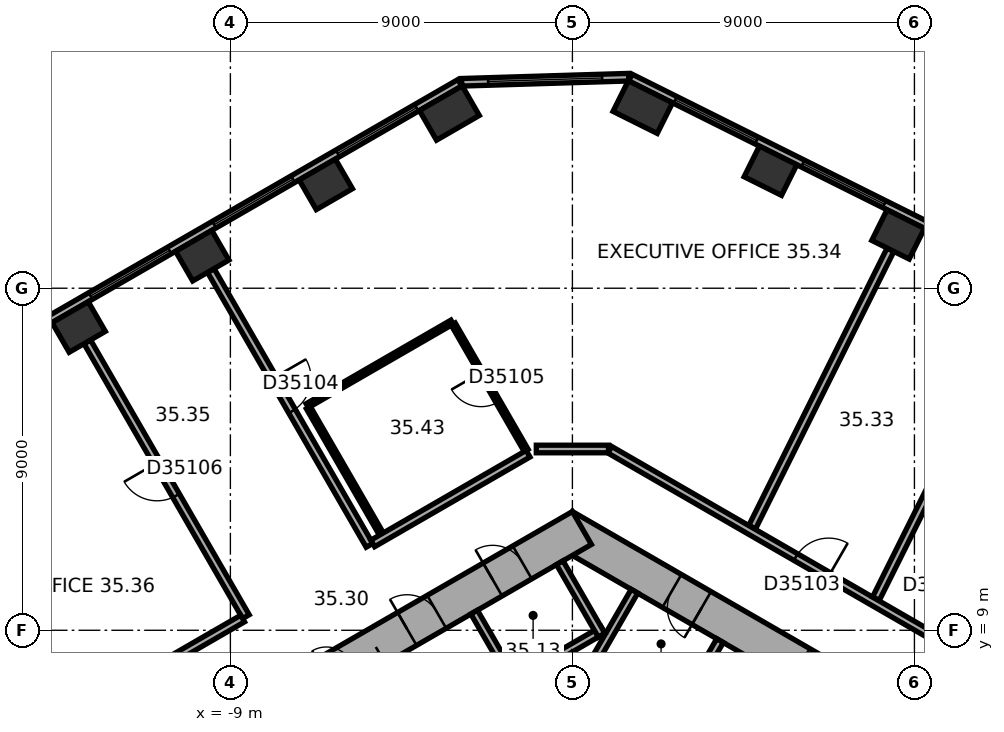
"""IFC4 building model, lengths in metres.
Left out: names, types, materials, properties, quantities, classifications, styles, units other than length and angle.
Written with IfcOpenShell. Run it as: python <this file> out.ifc"""

import sys

from ifc_helpers import new_model, si_unit, direction, frame, frame_2d, origin, origin_2d, place, context, subcontext, project, spatial, rectangle, extrude, element, fill, save


model = new_model("IFC4")
c1 = context("Model", 3, precision=1e-05, world=origin(), true_north=direction((0.0, 1.0)))
c2 = subcontext(c1, "Body", "Model", "MODEL_VIEW")
j1 = project(units=[si_unit("LENGTHUNIT", "METRE"), si_unit("PLANEANGLEUNIT", "RADIAN")], contexts=[c1])
p1 = place(None, origin())
s1 = spatial("IfcSite", under=j1, at=p1, CompositionType="ELEMENT")
p2 = place(p1, origin())
s2 = spatial("IfcBuilding", under=s1, at=p2, CompositionType="ELEMENT")
p3 = place(p2, frame((0.0, 0.0, 146.6)))
s3 = spatial("IfcBuildingStorey", under=s2, at=p3, CompositionType="ELEMENT", Elevation=146.6)
for number, where, z_axis, x_axis in (
    (1, (8.571, 19.416, 0.0), (0.0, 0.0, 1.0), (-0.895, 0.446, 0.0)),
    (2, (5.211, 21.091, 0.0), (0.0, 0.0, 1.0), (-0.895, 0.446, 0.0)),
):
    element("IfcColumn", number, at=place(p3, frame(where, z_axis=z_axis, x_axis=x_axis)), inside=s3, PredefinedType="COLUMN", context=c2, shape_type="SweptSolid", body=[
        extrude(rectangle(XDim=1.1, YDim=0.9, at=origin_2d()), origin(), (0.0, 0.0, 1.0), 3.7),
    ])
for number, where, z_axis, x_axis in (
    (3, (1.852, 22.766, 0.0), (0.0, 0.0, 1.0), (-0.895, 0.446, 0.0)),
    (4, (-3.238, 22.61, 0.0), (0.0, 0.0, 1.0), (-0.866, -0.5, 0.0)),
):
    element("IfcColumn", number, at=place(p3, frame(where, z_axis=z_axis, x_axis=x_axis)), inside=s3, PredefinedType="COLUMN", context=c2, shape_type="SweptSolid", body=[
        extrude(rectangle(XDim=1.3, YDim=0.9, at=origin_2d()), origin(), (0.0, 0.0, 1.0), 3.7),
    ])
for number, where, z_axis, x_axis in (
    (5, (-6.489, 20.733, 0.0), (0.0, 0.0, 1.0), (-0.866, -0.5, 0.0)),
    (6, (-9.74, 18.856, 0.0), (0.0, 0.0, 1.0), (-0.866, -0.5, 0.0)),
    (7, (-12.991, 16.979, 0.0), (0.0, 0.0, 1.0), (-0.866, -0.5, 0.0)),
):
    element("IfcColumn", number, at=place(p3, frame(where, z_axis=z_axis, x_axis=x_axis)), inside=s3, PredefinedType="COLUMN", context=c2, shape_type="SweptSolid", body=[
        extrude(rectangle(XDim=1.1, YDim=0.9, at=origin_2d()), origin(), (0.0, 0.0, 1.0), 3.7),
    ])
p4 = place(p3, frame((10.25, 5.629, 0.0), z_axis=(0.0, 0.0, 1.0), x_axis=(-0.866022616891, 0.50000482701, 0.0)))
e8 = element("IfcWall", 8, at=p4, inside=s3, PredefinedType="SHEAR", context=c2, shape_type="SweptSolid", body=[
    extrude(rectangle(XDim=12.125, YDim=1.0, at=frame_2d((6.062, 0.0))), origin(), (0.0, 0.0, 1.0), 3.7),
])
p5 = place(p4, frame((4.012, 0.0, 0.0)))
e9 = element("IfcOpeningElement", 9, at=p5, cuts=e8, PredefinedType="OPENING", context=c2, shape_type="SweptSolid", body=[
    extrude(rectangle(XDim=0.9, YDim=2.1, at=frame_2d((0.45, 1.05))), frame((0.0, 0.51, 0.0), z_axis=(0.0, -1.0, 0.0), x_axis=(1.0, 0.0, 0.0)), (0.0, 0.0, 1.0), 1.02),
])
p6 = place(p4, frame((7.912, 0.0, 0.0)))
e10 = element("IfcOpeningElement", 10, at=p6, cuts=e8, PredefinedType="OPENING", context=c2, shape_type="SweptSolid", body=[
    extrude(rectangle(XDim=0.9, YDim=2.1, at=frame_2d((0.45, 1.05))), frame((0.0, 0.51, 0.0), z_axis=(0.0, -1.0, 0.0), x_axis=(1.0, 0.0, 0.0)), (0.0, 0.0, 1.0), 1.02),
])
p7 = place(p3, frame((0.25, 11.691, 0.0), z_axis=(0.0, 0.0, 1.0), x_axis=(-0.866022616891, -0.50000482701, 0.0)))
e11 = element("IfcWall", 11, at=p7, inside=s3, PredefinedType="SHEAR", context=c2, shape_type="SweptSolid", body=[
    extrude(rectangle(XDim=12.125, YDim=1.0, at=frame_2d((6.062, 0.0))), origin(), (0.0, 0.0, 1.0), 3.7),
])
p8 = place(p7, frame((6.262, 0.0, 0.0)))
e12 = element("IfcOpeningElement", 12, at=p8, cuts=e11, PredefinedType="OPENING", context=c2, shape_type="SweptSolid", body=[
    extrude(rectangle(XDim=1.5, YDim=2.1, at=frame_2d((0.75, 1.05))), frame((0.0, 0.51, 0.0), z_axis=(0.0, -1.0, 0.0), x_axis=(1.0, 0.0, 0.0)), (0.0, 0.0, 1.0), 1.02),
])
p9 = place(p7, frame((1.812, 0.0, 0.0)))
e13 = element("IfcOpeningElement", 13, at=p9, cuts=e11, PredefinedType="OPENING", context=c2, shape_type="SweptSolid", body=[
    extrude(rectangle(XDim=0.9, YDim=2.1, at=frame_2d((0.45, 1.05))), frame((0.0, 0.51, 0.0), z_axis=(0.0, -1.0, 0.0), x_axis=(1.0, 0.0, 0.0)), (0.0, 0.0, 1.0), 1.02),
])
p10 = place(p7, frame((4.412, 0.0, 0.0)))
e14 = element("IfcOpeningElement", 14, at=p10, cuts=e11, PredefinedType="OPENING", context=c2, shape_type="SweptSolid", body=[
    extrude(rectangle(XDim=0.9, YDim=2.1, at=frame_2d((0.45, 1.05))), frame((0.0, 0.51, 0.0), z_axis=(0.0, -1.0, 0.0), x_axis=(1.0, 0.0, 0.0)), (0.0, 0.0, 1.0), 1.02),
])
p11 = place(p3, frame((19.464, 14.599, 0.0), z_axis=(0.0, 0.0, 1.0), x_axis=(-0.894935755043, 0.446195018289, 0.0)))
e15 = element("IfcWall", 15, at=p11, inside=s3, PredefinedType="STANDARD", context=c2, shape_type="SweptSolid", body=[
    extrude(rectangle(XDim=20.044, YDim=0.2, at=frame_2d((10.022, 0.0))), origin(), (0.0, 0.0, 1.0), 3.7),
])
p12 = place(p11, frame((1.313, 0.0, 0.9)))
e16 = element("IfcOpeningElement", 16, at=p12, cuts=e15, PredefinedType="OPENING", context=c2, shape_type="SweptSolid", body=[
    extrude(rectangle(XDim=2.4, YDim=2.0, at=frame_2d((1.2, 1.0))), frame((0.0, 0.11, 0.0), z_axis=(0.0, -1.0, 0.0), x_axis=(1.0, 0.0, 0.0)), (0.0, 0.0, 1.0), 0.22),
])
p13 = place(p11, frame((5.067, 0.0, 0.9)))
e17 = element("IfcOpeningElement", 17, at=p13, cuts=e15, PredefinedType="OPENING", context=c2, shape_type="SweptSolid", body=[
    extrude(rectangle(XDim=2.4, YDim=2.0, at=frame_2d((1.2, 1.0))), frame((0.0, 0.11, 0.0), z_axis=(0.0, -1.0, 0.0), x_axis=(1.0, 0.0, 0.0)), (0.0, 0.0, 1.0), 0.22),
])
p14 = place(p11, frame((8.821, 0.0, 0.9)))
e18 = element("IfcOpeningElement", 18, at=p14, cuts=e15, PredefinedType="OPENING", context=c2, shape_type="SweptSolid", body=[
    extrude(rectangle(XDim=2.4, YDim=2.0, at=frame_2d((1.2, 1.0))), frame((0.0, 0.11, 0.0), z_axis=(0.0, -1.0, 0.0), x_axis=(1.0, 0.0, 0.0)), (0.0, 0.0, 1.0), 0.22),
])
p15 = place(p11, frame((12.575, 0.0, 0.9)))
e19 = element("IfcOpeningElement", 19, at=p15, cuts=e15, PredefinedType="OPENING", context=c2, shape_type="SweptSolid", body=[
    extrude(rectangle(XDim=2.4, YDim=2.0, at=frame_2d((1.2, 1.0))), frame((0.0, 0.11, 0.0), z_axis=(0.0, -1.0, 0.0), x_axis=(1.0, 0.0, 0.0)), (0.0, 0.0, 1.0), 0.22),
])
p16 = place(p11, frame((16.329, 0.0, 0.9)))
e20 = element("IfcOpeningElement", 20, at=p16, cuts=e15, PredefinedType="OPENING", context=c2, shape_type="SweptSolid", body=[
    extrude(rectangle(XDim=2.4, YDim=2.0, at=frame_2d((1.2, 1.0))), frame((0.0, 0.11, 0.0), z_axis=(0.0, -1.0, 0.0), x_axis=(1.0, 0.0, 0.0)), (0.0, 0.0, 1.0), 0.22),
])
p17 = place(p3, frame((1.479, 23.553, 0.0), z_axis=(0.0, 0.0, 1.0), x_axis=(-0.999534786117, -0.03049936625, 0.0)))
e21 = element("IfcWall", 21, at=p17, inside=s3, PredefinedType="STANDARD", context=c2, shape_type="SweptSolid", body=[
    extrude(rectangle(XDim=4.395, YDim=0.2, at=frame_2d((2.197, 0.0))), origin(), (0.0, 0.0, 1.0), 3.7),
])
p18 = place(p17, frame((0.698, 0.0, 0.9)))
e22 = element("IfcOpeningElement", 22, at=p18, cuts=e21, PredefinedType="OPENING", context=c2, shape_type="SweptSolid", body=[
    extrude(rectangle(XDim=3.0, YDim=2.0, at=frame_2d((1.5, 1.0))), frame((0.0, 0.11, 0.0), z_axis=(0.0, -1.0, 0.0), x_axis=(1.0, 0.0, 0.0)), (0.0, 0.0, 1.0), 0.22),
])
p19 = place(p3, frame((-2.961, 23.405, 0.0), z_axis=(0.0, 0.0, 1.0), x_axis=(-0.866023315909, -0.500003616288, 0.0)))
e23 = element("IfcWall", 23, at=p19, inside=s3, PredefinedType="STANDARD", context=c2, shape_type="SweptSolid", body=[
    extrude(rectangle(XDim=20.044, YDim=0.2, at=frame_2d((10.022, 0.0))), origin(), (0.0, 0.0, 1.0), 3.7),
])
p20 = place(p19, frame((1.314, 0.0, 0.9)))
e24 = element("IfcOpeningElement", 24, at=p20, cuts=e23, PredefinedType="OPENING", context=c2, shape_type="SweptSolid", body=[
    extrude(rectangle(XDim=2.4, YDim=2.0, at=frame_2d((1.2, 1.0))), frame((0.0, 0.11, 0.0), z_axis=(0.0, -1.0, 0.0), x_axis=(1.0, 0.0, 0.0)), (0.0, 0.0, 1.0), 0.22),
])
p21 = place(p19, frame((5.069, 0.0, 0.9)))
e25 = element("IfcOpeningElement", 25, at=p21, cuts=e23, PredefinedType="OPENING", context=c2, shape_type="SweptSolid", body=[
    extrude(rectangle(XDim=2.4, YDim=2.0, at=frame_2d((1.2, 1.0))), frame((0.0, 0.11, 0.0), z_axis=(0.0, -1.0, 0.0), x_axis=(1.0, 0.0, 0.0)), (0.0, 0.0, 1.0), 0.22),
])
p22 = place(p19, frame((8.823, 0.0, 0.9)))
e26 = element("IfcOpeningElement", 26, at=p22, cuts=e23, PredefinedType="OPENING", context=c2, shape_type="SweptSolid", body=[
    extrude(rectangle(XDim=2.4, YDim=2.0, at=frame_2d((1.2, 1.0))), frame((0.0, 0.11, 0.0), z_axis=(0.0, -1.0, 0.0), x_axis=(1.0, 0.0, 0.0)), (0.0, 0.0, 1.0), 0.22),
])
p23 = place(p19, frame((12.577, 0.0, 0.9)))
e27 = element("IfcOpeningElement", 27, at=p23, cuts=e23, PredefinedType="OPENING", context=c2, shape_type="SweptSolid", body=[
    extrude(rectangle(XDim=2.4, YDim=2.0, at=frame_2d((1.2, 1.0))), frame((0.0, 0.11, 0.0), z_axis=(0.0, -1.0, 0.0), x_axis=(1.0, 0.0, 0.0)), (0.0, 0.0, 1.0), 0.22),
])
p24 = place(p19, frame((16.331, 0.0, 0.9)))
e28 = element("IfcOpeningElement", 28, at=p24, cuts=e23, PredefinedType="OPENING", context=c2, shape_type="SweptSolid", body=[
    extrude(rectangle(XDim=2.4, YDim=2.0, at=frame_2d((1.2, 1.0))), frame((0.0, 0.11, 0.0), z_axis=(0.0, -1.0, 0.0), x_axis=(1.0, 0.0, 0.0)), (0.0, 0.0, 1.0), 0.22),
])
for number, where, z_axis, x_axis in (
    (29, (2.784, 6.822, 0.0), (0.0, 0.0, 1.0), (0.5, 0.866, 0.0)),
    (30, (0.532, 8.122, 0.0), (0.0, 0.0, 1.0), (0.5, 0.866, 0.0)),
):
    element("IfcWall", number, at=place(p3, frame(where, z_axis=z_axis, x_axis=x_axis)), inside=s3, PredefinedType="PARTITIONING", context=c2, shape_type="SweptSolid", body=[
        extrude(rectangle(XDim=2.2, YDim=0.2, at=frame_2d((1.1, 0.0))), origin(), (0.0, 0.0, 1.0), 3.42),
    ])
p25 = place(p3, frame((0.803, 9.009, 0.0), z_axis=(0.0, 0.0, 1.0), x_axis=(-0.866028230842, -0.499995103361, 0.0)))
e31 = element("IfcWall", 31, at=p25, inside=s3, PredefinedType="PARTITIONING", context=c2, shape_type="SweptSolid", body=[
    extrude(rectangle(XDim=5.4, YDim=0.2, at=frame_2d((2.7, 0.0))), origin(), (0.0, 0.0, 1.0), 3.42),
])
p26 = place(p3, frame((0.767, 8.872, 0.0), z_axis=(0.0, 0.0, 1.0), x_axis=(-0.499994660107, 0.866028486751, 0.0)))
e32 = element("IfcWall", 32, at=p26, inside=s3, PredefinedType="PARTITIONING", context=c2, shape_type="SweptSolid", body=[
    extrude(rectangle(XDim=2.2, YDim=0.2, at=frame_2d((1.1, 0.0))), origin(), (0.0, 0.0, 1.0), 3.42),
])
p27 = place(p3, frame((-1.485, 7.572, 0.0), z_axis=(0.0, 0.0, 1.0), x_axis=(-0.50002983664, 0.866008176907, 0.0)))
e33 = element("IfcWall", 33, at=p27, inside=s3, PredefinedType="PARTITIONING", context=c2, shape_type="SweptSolid", body=[
    extrude(rectangle(XDim=2.2, YDim=0.2, at=frame_2d((1.1, 0.0))), origin(), (0.0, 0.0, 1.0), 3.42),
])
p28 = place(p3, frame((-2.216, 4.282, 0.0), z_axis=(0.0, 0.0, 1.0), x_axis=(0.499977259774, 0.866038532462, 0.0)))
e34 = element("IfcWall", 34, at=p28, inside=s3, PredefinedType="SHEAR", context=c2, shape_type="SweptSolid", body=[
    extrude(rectangle(XDim=4.7, YDim=0.3, at=frame_2d((2.35, 0.0))), origin(), (0.0, 0.0, 1.0), 3.42),
])
p29 = place(p3, frame((-12.766, 16.589, 0.0), z_axis=(0.0, 0.0, 1.0), x_axis=(0.500010139422, -0.866019549707, 0.0)))
e35 = element("IfcWall", 35, at=p29, inside=s3, PredefinedType="PARTITIONING", context=c2, shape_type="SweptSolid", body=[
    extrude(rectangle(XDim=8.35, YDim=0.2, at=frame_2d((4.175, 0.0))), origin(), (0.0, 0.0, 1.0), 3.42),
])
p30 = place(p29, frame((3.675, 0.0, 0.0)))
e36 = element("IfcOpeningElement", 36, at=p30, cuts=e35, PredefinedType="OPENING", context=c2, shape_type="SweptSolid", body=[
    extrude(rectangle(XDim=1.0, YDim=2.1, at=frame_2d((0.5, 1.05))), frame((0.0, 0.11, 0.0), z_axis=(0.0, -1.0, 0.0), x_axis=(1.0, 0.0, 0.0)), (0.0, 0.0, 1.0), 0.22),
])
p31 = place(p3, frame((-9.515, 18.466, 0.0), z_axis=(0.0, 0.0, 1.0), x_axis=(0.500010139422, -0.866019549707, 0.0)))
e37 = element("IfcWall", 37, at=p31, inside=s3, PredefinedType="PARTITIONING", context=c2, shape_type="SweptSolid", body=[
    extrude(rectangle(XDim=8.35, YDim=0.2, at=frame_2d((4.175, 0.0))), origin(), (0.0, 0.0, 1.0), 2.87),
])
p32 = place(p31, frame((3.275, 0.0, 0.0)))
e38 = element("IfcOpeningElement", 38, at=p32, cuts=e37, PredefinedType="OPENING", context=c2, shape_type="SweptSolid", body=[
    extrude(rectangle(XDim=1.0, YDim=2.1, at=frame_2d((0.5, 1.05))), frame((0.0, 0.11, 0.0), z_axis=(0.0, -1.0, 0.0), x_axis=(1.0, 0.0, 0.0)), (0.0, 0.0, 1.0), 0.22),
])
p33 = place(p3, frame((-8.678, 9.308, 0.0), z_axis=(0.0, 0.0, 1.0), x_axis=(-0.866000359435, -0.500043375578, 0.0)))
e39 = element("IfcWall", 39, at=p33, inside=s3, PredefinedType="PARTITIONING", context=c2, shape_type="SweptSolid", body=[
    extrude(rectangle(XDim=3.161, YDim=0.2, at=frame_2d((1.581, 0.0))), origin(), (0.0, 0.0, 1.0), 3.42),
])
p34 = place(p3, frame((-6.977, 14.909, 0.0), z_axis=(0.0, 0.0, 1.0), x_axis=(0.866032203192, 0.499988222896, 0.0)))
e40 = element("IfcWall", 40, at=p34, inside=s3, PredefinedType="PARTITIONING", context=c2, shape_type="SweptSolid", body=[
    extrude(rectangle(XDim=4.4, YDim=0.12, at=frame_2d((2.2, 0.0))), origin(), (0.0, 0.0, 1.0), 3.42),
])
p35 = place(p3, frame((-5.027, 11.531, 0.0), z_axis=(0.0, 0.0, 1.0), x_axis=(-0.499995802899, 0.866027826969, 0.0)))
e41 = element("IfcWall", 41, at=p35, inside=s3, PredefinedType="PARTITIONING", context=c2, shape_type="SweptSolid", body=[
    extrude(rectangle(XDim=3.84, YDim=0.12, at=frame_2d((1.92, 0.0))), origin(), (0.0, 0.0, 1.0), 3.42),
])
p36 = place(p3, frame((-3.136, 17.057, 0.0), z_axis=(0.0, 0.0, 1.0), x_axis=(0.499995802899, -0.866027826969, 0.0)))
e42 = element("IfcWall", 42, at=p36, inside=s3, PredefinedType="PARTITIONING", context=c2, shape_type="SweptSolid", body=[
    extrude(rectangle(XDim=3.84, YDim=0.12, at=frame_2d((1.92, 0.0))), origin(), (0.0, 0.0, 1.0), 3.42),
])
p37 = place(p36, frame((1.47, 0.0, 0.0)))
e43 = element("IfcOpeningElement", 43, at=p37, cuts=e42, PredefinedType="OPENING", context=c2, shape_type="SweptSolid", body=[
    extrude(rectangle(XDim=0.9, YDim=2.1, at=frame_2d((0.45, 1.05))), frame((0.0, 0.07, 0.0), z_axis=(0.0, -1.0, 0.0), x_axis=(1.0, 0.0, 0.0)), (0.0, 0.0, 1.0), 0.14),
])
p38 = place(p3, frame((-1.167, 13.645, 0.0), z_axis=(0.0, 0.0, 1.0), x_axis=(-0.866034830959, -0.499983671299, 0.0)))
e44 = element("IfcWall", 44, at=p38, inside=s3, PredefinedType="PARTITIONING", context=c2, shape_type="SweptSolid", body=[
    extrude(rectangle(XDim=4.719, YDim=0.2, at=frame_2d((2.36, 0.0))), origin(), (0.0, 0.0, 1.0), 3.42),
])
p39 = place(p3, frame((0.95, 13.77, 0.0), z_axis=(0.0, 0.0, 1.0), x_axis=(-1.0, 0.0, 0.0)))
e45 = element("IfcWall", 45, at=p39, inside=s3, PredefinedType="PARTITIONING", context=c2, shape_type="SweptSolid", body=[
    extrude(rectangle(XDim=1.9, YDim=0.2, at=frame_2d((0.95, 0.0))), origin(), (0.0, 0.0, 1.0), 3.42),
])
p40 = place(p3, frame((8.37, 19.013, 0.0), z_axis=(0.0, 0.0, 1.0), x_axis=(-0.446183598632, -0.894941448538, 0.0)))
e46 = element("IfcWall", 46, at=p40, inside=s3, PredefinedType="PARTITIONING", context=c2, shape_type="SweptSolid", body=[
    extrude(rectangle(XDim=8.156, YDim=0.2, at=frame_2d((4.078, 0.0))), origin(), (0.0, 0.0, 1.0), 3.42),
])
p41 = place(p3, frame((11.233, 7.833, 0.0), z_axis=(0.0, 0.0, 1.0), x_axis=(-0.866021713988, 0.50000639086, 0.0)))
e47 = element("IfcWall", 47, at=p41, inside=s3, PredefinedType="PARTITIONING", context=c2, shape_type="SweptSolid", body=[
    extrude(rectangle(XDim=11.834, YDim=0.2, at=frame_2d((5.917, 0.0))), origin(), (0.0, 0.0, 1.0), 3.42),
])
p42 = place(p41, frame((5.185, 0.0, 0.0)))
e48 = element("IfcOpeningElement", 48, at=p42, cuts=e47, PredefinedType="OPENING", context=c2, shape_type="SweptSolid", body=[
    extrude(rectangle(XDim=1.0, YDim=2.1, at=frame_2d((0.5, 1.05))), frame((0.0, 0.11, 0.0), z_axis=(0.0, -1.0, 0.0), x_axis=(1.0, 0.0, 0.0)), (0.0, 0.0, 1.0), 0.22),
])
p43 = place(p3, frame((11.73, 17.338, 0.0), z_axis=(0.0, 0.0, 1.0), x_axis=(-0.446165200553, -0.894950620881, 0.0)))
e49 = element("IfcWall", 49, at=p43, inside=s3, PredefinedType="PARTITIONING", context=c2, shape_type="SweptSolid", body=[
    extrude(rectangle(XDim=8.386, YDim=0.2, at=frame_2d((4.193, 0.0))), origin(), (0.0, 0.0, 1.0), 2.87),
])
p44 = place(p15, origin())
e50 = element("IfcWindow", 50, at=p44, inside=s3, PartitioningType="SINGLE_PANEL", PredefinedType="WINDOW", context=c2, shape_type="SweptSolid", body=[
    extrude(rectangle(XDim=2.4, YDim=2.0, at=frame_2d((1.2, 1.0))), frame((0.0, 0.03, 0.0), z_axis=(0.0, -1.0, 0.0), x_axis=(1.0, 0.0, 0.0)), (0.0, 0.0, 1.0), 0.06),
])
fill(e19, e50)
p45 = place(p16, origin())
e51 = element("IfcWindow", 51, at=p45, inside=s3, PartitioningType="SINGLE_PANEL", PredefinedType="WINDOW", context=c2, shape_type="SweptSolid", body=[
    extrude(rectangle(XDim=2.4, YDim=2.0, at=frame_2d((1.2, 1.0))), frame((0.0, 0.03, 0.0), z_axis=(0.0, -1.0, 0.0), x_axis=(1.0, 0.0, 0.0)), (0.0, 0.0, 1.0), 0.06),
])
fill(e20, e51)
p46 = place(p18, origin())
e52 = element("IfcWindow", 52, at=p46, inside=s3, PartitioningType="SINGLE_PANEL", PredefinedType="WINDOW", context=c2, shape_type="SweptSolid", body=[
    extrude(rectangle(XDim=3.0, YDim=2.0, at=frame_2d((1.5, 1.0))), frame((0.0, 0.03, 0.0), z_axis=(0.0, -1.0, 0.0), x_axis=(1.0, 0.0, 0.0)), (0.0, 0.0, 1.0), 0.06),
])
fill(e22, e52)
p47 = place(p20, origin())
e53 = element("IfcWindow", 53, at=p47, inside=s3, PartitioningType="SINGLE_PANEL", PredefinedType="WINDOW", context=c2, shape_type="SweptSolid", body=[
    extrude(rectangle(XDim=2.4, YDim=2.0, at=frame_2d((1.2, 1.0))), frame((0.0, 0.03, 0.0), z_axis=(0.0, -1.0, 0.0), x_axis=(1.0, 0.0, 0.0)), (0.0, 0.0, 1.0), 0.06),
])
fill(e24, e53)
p48 = place(p21, origin())
e54 = element("IfcWindow", 54, at=p48, inside=s3, PartitioningType="SINGLE_PANEL", PredefinedType="WINDOW", context=c2, shape_type="SweptSolid", body=[
    extrude(rectangle(XDim=2.4, YDim=2.0, at=frame_2d((1.2, 1.0))), frame((0.0, 0.03, 0.0), z_axis=(0.0, -1.0, 0.0), x_axis=(1.0, 0.0, 0.0)), (0.0, 0.0, 1.0), 0.06),
])
fill(e25, e54)
p49 = place(p22, origin())
e55 = element("IfcWindow", 55, at=p49, inside=s3, PartitioningType="SINGLE_PANEL", PredefinedType="WINDOW", context=c2, shape_type="SweptSolid", body=[
    extrude(rectangle(XDim=2.4, YDim=2.0, at=frame_2d((1.2, 1.0))), frame((0.0, 0.03, 0.0), z_axis=(0.0, -1.0, 0.0), x_axis=(1.0, 0.0, 0.0)), (0.0, 0.0, 1.0), 0.06),
])
fill(e26, e55)
p50 = place(p8, origin())
e56 = element("IfcDoor", 56, at=p50, inside=s3, OperationType="DOUBLE_DOOR_SINGLE_SWING", PredefinedType="DOOR", context=c2, shape_type="SweptSolid", body=[
    extrude(rectangle(XDim=1.5, YDim=2.1, at=frame_2d((0.75, 1.05))), frame((0.0, 0.025, 0.0), z_axis=(0.0, -1.0, 0.0), x_axis=(1.0, 0.0, 0.0)), (0.0, 0.0, 1.0), 0.05),
])
fill(e12, e56)
p51 = place(p6, origin())
e57 = element("IfcDoor", 57, at=p51, inside=s3, OperationType="SINGLE_SWING_LEFT", PredefinedType="DOOR", context=c2, shape_type="SweptSolid", body=[
    extrude(rectangle(XDim=0.9, YDim=2.1, at=frame_2d((0.45, 1.05))), frame((0.0, 0.025, 0.0), z_axis=(0.0, -1.0, 0.0), x_axis=(1.0, 0.0, 0.0)), (0.0, 0.0, 1.0), 0.05),
])
fill(e10, e57)
p52 = place(p9, origin())
e58 = element("IfcDoor", 58, at=p52, inside=s3, OperationType="SINGLE_SWING_LEFT", PredefinedType="DOOR", context=c2, shape_type="SweptSolid", body=[
    extrude(rectangle(XDim=0.9, YDim=2.1, at=frame_2d((0.45, 1.05))), frame((0.0, 0.025, 0.0), z_axis=(0.0, -1.0, 0.0), x_axis=(1.0, 0.0, 0.0)), (0.0, 0.0, 1.0), 0.05),
])
fill(e13, e58)
p53 = place(p10, origin())
e59 = element("IfcDoor", 59, at=p53, inside=s3, OperationType="SINGLE_SWING_LEFT", PredefinedType="DOOR", context=c2, shape_type="SweptSolid", body=[
    extrude(rectangle(XDim=0.9, YDim=2.1, at=frame_2d((0.45, 1.05))), frame((0.0, 0.025, 0.0), z_axis=(0.0, -1.0, 0.0), x_axis=(1.0, 0.0, 0.0)), (0.0, 0.0, 1.0), 0.05),
])
fill(e14, e59)
p54 = place(p42, origin())
e60 = element("IfcDoor", 60, at=p54, inside=s3, OperationType="SINGLE_SWING_LEFT", PredefinedType="DOOR", context=c2, shape_type="SweptSolid", body=[
    extrude(rectangle(XDim=1.0, YDim=2.1, at=frame_2d((0.5, 1.05))), frame((0.0, 0.025, 0.0), z_axis=(0.0, -1.0, 0.0), x_axis=(1.0, 0.0, 0.0)), (0.0, 0.0, 1.0), 0.05),
])
fill(e48, e60)
p55 = place(p32, origin())
e61 = element("IfcDoor", 61, at=p55, inside=s3, OperationType="SINGLE_SWING_LEFT", PredefinedType="DOOR", context=c2, shape_type="SweptSolid", body=[
    extrude(rectangle(XDim=1.0, YDim=2.1, at=frame_2d((0.5, 1.05))), frame((0.0, 0.025, 0.0), z_axis=(0.0, -1.0, 0.0), x_axis=(1.0, 0.0, 0.0)), (0.0, 0.0, 1.0), 0.05),
])
fill(e38, e61)
p56 = place(p37, origin())
e62 = element("IfcDoor", 62, at=p56, inside=s3, OperationType="SINGLE_SWING_LEFT", PredefinedType="DOOR", context=c2, shape_type="SweptSolid", body=[
    extrude(rectangle(XDim=0.9, YDim=2.1, at=frame_2d((0.45, 1.05))), frame((0.0, 0.025, 0.0), z_axis=(0.0, -1.0, 0.0), x_axis=(1.0, 0.0, 0.0)), (0.0, 0.0, 1.0), 0.05),
])
fill(e43, e62)
p57 = place(p30, origin())
e63 = element("IfcDoor", 63, at=p57, inside=s3, OperationType="SINGLE_SWING_LEFT", PredefinedType="DOOR", context=c2, shape_type="SweptSolid", body=[
    extrude(rectangle(XDim=1.0, YDim=2.1, at=frame_2d((0.5, 1.05))), frame((0.0, 0.025, 0.0), z_axis=(0.0, -1.0, 0.0), x_axis=(1.0, 0.0, 0.0)), (0.0, 0.0, 1.0), 0.05),
])
fill(e36, e63)
save(model, sys.argv[1])
